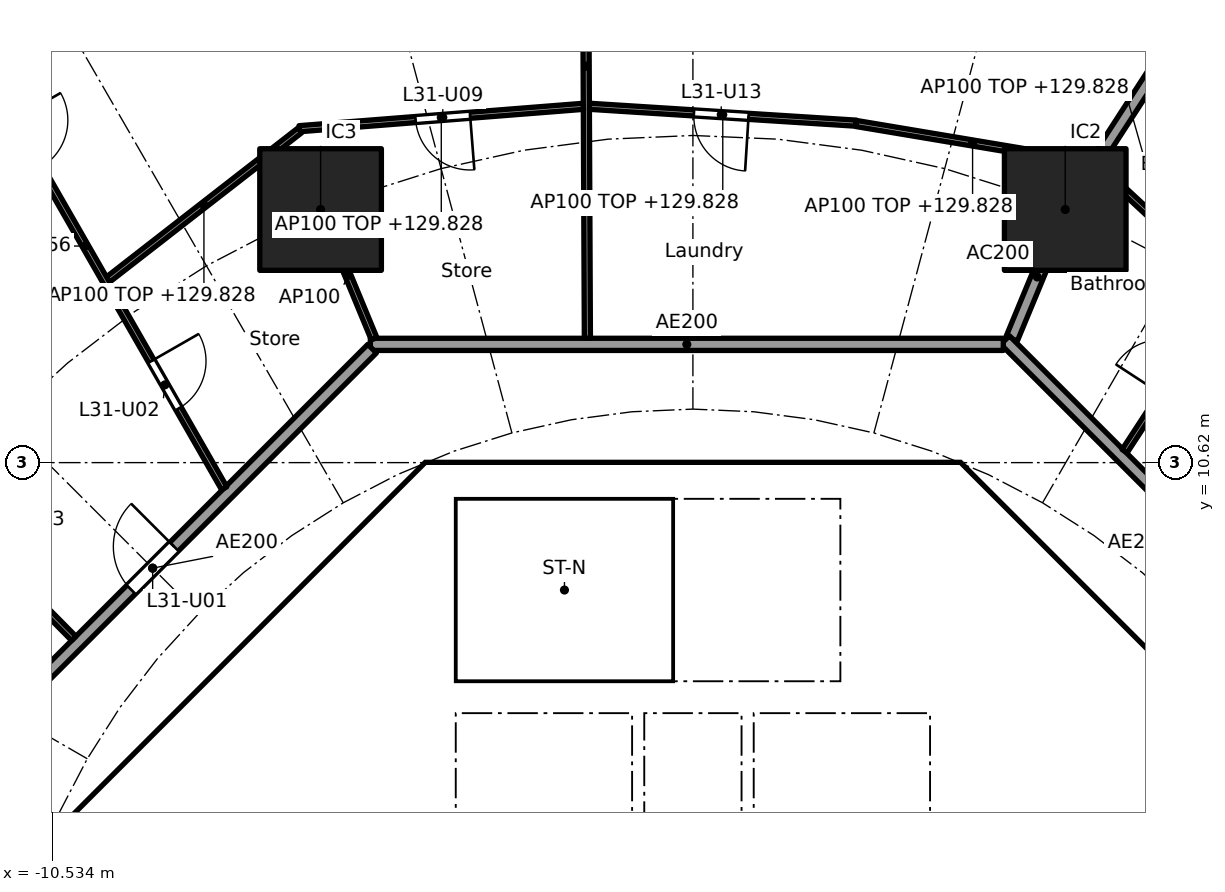
"""IFC4 building model, lengths in metres.
Left out: names, types, materials, properties, quantities, classifications, styles, units other than length and angle.
Written with IfcOpenShell. Run it as: python <this file> out.ifc"""

import sys

from ifc_helpers import new_model, si_unit, direction, frame, frame_2d, origin, origin_2d, place, context, subcontext, project, spatial, polyline, rectangle, outline, extrude, element, fill, save


model = new_model("IFC4")
c1 = context("Model", 3, precision=1e-05, world=origin(), true_north=direction((0.0, 1.0)))
c2 = subcontext(c1, "Body", "Model", "MODEL_VIEW")
j1 = project(units=[si_unit("LENGTHUNIT", "METRE"), si_unit("PLANEANGLEUNIT", "RADIAN")], contexts=[c1])
p1 = place(None, origin())
s1 = spatial("IfcSite", under=j1, at=p1, CompositionType="ELEMENT")
p2 = place(p1, origin())
s2 = spatial("IfcBuilding", under=s1, at=p2, CompositionType="ELEMENT")
p3 = place(p2, frame((0.0, 0.0, 127.0)))
s3 = spatial("IfcBuildingStorey", under=s2, at=p3, CompositionType="ELEMENT", Elevation=127.0)
for number, where, z_axis, x_axis in (
    (1, (6.123, 14.782, 0.0), (0.0, 0.0, 1.0), (1.0, 0.0, 0.0)),
    (2, (-6.123, 14.782, 0.0), (0.0, 0.0, 1.0), (1.0, 0.0, 0.0)),
):
    element("IfcColumn", number, at=place(p3, frame(where, z_axis=z_axis, x_axis=x_axis)), inside=s3, PredefinedType="COLUMN", context=c2, shape_type="SweptSolid", body=[
        extrude(rectangle(XDim=2.0, YDim=2.0, at=origin_2d()), origin(), (0.0, 0.0, 1.0), 3.7),
    ])
p4 = place(p3, frame((9.988, 4.613, 0.0), z_axis=(0.0, 0.0, 1.0), x_axis=(-0.707106781187, 0.707106781187, 0.0)))
e3 = element("IfcWall", 3, at=p4, inside=s3, PredefinedType="SHEAR", context=c2, shape_type="SweptSolid", body=[
    extrude(rectangle(XDim=7.602, YDim=0.6, at=frame_2d((3.801, 0.0))), origin(), (0.0, 0.0, 1.0), 3.44),
])
p5 = place(p4, frame((3.201, 0.0, 0.0)))
e4 = element("IfcOpeningElement", 4, at=p5, cuts=e3, PredefinedType="OPENING", context=c2, shape_type="SweptSolid", body=[
    extrude(rectangle(XDim=1.2, YDim=2.1, at=frame_2d((0.6, 1.05))), frame((0.0, 0.31, 0.0), z_axis=(0.0, -1.0, 0.0), x_axis=(1.0, 0.0, 0.0)), (0.0, 0.0, 1.0), 0.62),
])
p6 = place(p3, frame((-4.613, 9.988, 0.0), z_axis=(0.0, 0.0, 1.0), x_axis=(-0.707106781187, -0.707106781187, 0.0)))
e5 = element("IfcWall", 5, at=p6, inside=s3, PredefinedType="SHEAR", context=c2, shape_type="SweptSolid", body=[
    extrude(rectangle(XDim=7.602, YDim=0.6, at=frame_2d((3.801, 0.0))), origin(), (0.0, 0.0, 1.0), 3.44),
])
p7 = place(p6, frame((0.351, 0.0, 0.0)))
e6 = element("IfcOpeningElement", 6, at=p7, cuts=e5, PredefinedType="OPENING", context=c2, shape_type="SweptSolid", body=[
    extrude(rectangle(XDim=1.1, YDim=2.1, at=frame_2d((0.55, 1.05))), frame((0.0, 0.31, 0.0), z_axis=(0.0, -1.0, 0.0), x_axis=(1.0, 0.0, 0.0)), (0.0, 0.0, 1.0), 0.62),
])
p8 = place(p3, frame((-6.2, 4.3, 0.0), z_axis=(0.0, 0.0, 1.0), x_axis=(0.0, 1.0, 0.0)))
e7 = element("IfcWall", 7, at=p8, inside=s3, PredefinedType="PARTITIONING", context=c2, shape_type="SweptSolid", body=[
    extrude(rectangle(XDim=3.527, YDim=0.15, at=frame_2d((1.763, 0.0))), origin(), (0.0, 0.0, 1.0), 3.44),
])
p9 = place(p8, frame((0.262, 0.0, 0.0)))
e8 = element("IfcOpeningElement", 8, at=p9, cuts=e7, PredefinedType="OPENING", context=c2, shape_type="SweptSolid", body=[
    extrude(rectangle(XDim=0.9, YDim=2.1, at=frame_2d((0.45, 1.05))), frame((0.0, 0.085, 0.0), z_axis=(0.0, -1.0, 0.0), x_axis=(1.0, 0.0, 0.0)), (0.0, 0.0, 1.0), 0.17),
])
p10 = place(p8, frame((2.138, 0.0, 0.0)))
e9 = element("IfcOpeningElement", 9, at=p10, cuts=e7, PredefinedType="OPENING", context=c2, shape_type="SweptSolid", body=[
    extrude(rectangle(XDim=0.9, YDim=2.1, at=frame_2d((0.45, 1.05))), frame((0.0, 0.085, 0.0), z_axis=(0.0, -1.0, 0.0), x_axis=(1.0, 0.0, 0.0)), (0.0, 0.0, 1.0), 0.17),
])
p11 = place(p3, frame((4.0, 4.3, 0.0), z_axis=(0.0, 0.0, 1.0), x_axis=(0.0, 1.0, 0.0)))
e10 = element("IfcWall", 10, at=p11, inside=s3, PredefinedType="SOLIDWALL", context=c2, shape_type="SweptSolid", body=[
    extrude(rectangle(XDim=2.2, YDim=0.2, at=frame_2d((1.1, 0.0))), origin(), (0.0, 0.0, 1.0), 3.44),
])
p12 = place(p11, frame((0.55, 0.0, 0.0)))
e11 = element("IfcOpeningElement", 11, at=p12, cuts=e10, PredefinedType="OPENING", context=c2, shape_type="SweptSolid", body=[
    extrude(rectangle(XDim=1.1, YDim=2.1, at=frame_2d((0.55, 1.05))), frame((0.0, 0.11, 0.0), z_axis=(0.0, -1.0, 0.0), x_axis=(1.0, 0.0, 0.0)), (0.0, 0.0, 1.0), 0.22),
])
p13 = place(p3, frame((-4.0, 4.3, 0.0), z_axis=(0.0, 0.0, 1.0), x_axis=(0.0, 1.0, 0.0)))
e12 = element("IfcWall", 12, at=p13, inside=s3, PredefinedType="SOLIDWALL", context=c2, shape_type="SweptSolid", body=[
    extrude(rectangle(XDim=2.2, YDim=0.2, at=frame_2d((1.1, 0.0))), origin(), (0.0, 0.0, 1.0), 3.44),
])
p14 = place(p13, frame((0.55, 0.0, 0.0)))
e13 = element("IfcOpeningElement", 13, at=p14, cuts=e12, PredefinedType="OPENING", context=c2, shape_type="SweptSolid", body=[
    extrude(rectangle(XDim=1.1, YDim=2.1, at=frame_2d((0.55, 1.05))), frame((0.0, 0.11, 0.0), z_axis=(0.0, -1.0, 0.0), x_axis=(1.0, 0.0, 0.0)), (0.0, 0.0, 1.0), 0.22),
])
p15 = place(p3, frame((4.0, 7.025, 0.0), z_axis=(0.0, 0.0, 1.0), x_axis=(0.0, 1.0, 0.0)))
e14 = element("IfcWall", 14, at=p15, inside=s3, PredefinedType="SOLIDWALL", context=c2, shape_type="SweptSolid", body=[
    extrude(rectangle(XDim=3.0, YDim=0.2, at=frame_2d((1.5, 0.0))), origin(), (0.0, 0.0, 1.0), 3.44),
])
p16 = place(p15, frame((0.925, 0.0, 0.0)))
e15 = element("IfcOpeningElement", 15, at=p16, cuts=e14, PredefinedType="OPENING", context=c2, shape_type="SweptSolid", body=[
    extrude(rectangle(XDim=1.1, YDim=2.1, at=frame_2d((0.55, 1.05))), frame((0.0, 0.11, 0.0), z_axis=(0.0, -1.0, 0.0), x_axis=(1.0, 0.0, 0.0)), (0.0, 0.0, 1.0), 0.22),
])
p17 = place(p3, origin())
e16 = element("IfcWall", 16, at=p17, inside=s3, PredefinedType="SHEAR", context=c2, shape_type="SweptSolid", body=[
    extrude(outline(polyline([(-4.152, 10.025), (-4.401, 9.776), (-4.825, 10.2), (-4.401, 10.625), (4.401, 10.625), (4.825, 10.2), (4.401, 9.776), (4.152, 10.025), (-4.152, 10.025)])), origin(), (0.0, 0.0, 1.0), 3.44),
])
p18 = place(p3, frame((-8.301, 5.8, 0.0), z_axis=(0.0, 0.0, 1.0), x_axis=(1.0, 0.0, 0.0)))
e17 = element("IfcWall", 17, at=p18, inside=s3, PredefinedType="PARTITIONING", context=c2, shape_type="SweptSolid", body=[
    extrude(rectangle(XDim=2.026, YDim=0.15, at=frame_2d((1.013, 0.0))), origin(), (0.0, 0.0, 1.0), 3.44),
])
for number, where, z_axis, x_axis in (
    (18, (-0.9, 4.3, 0.0), (0.0, 0.0, 1.0), (0.0, 1.0, 0.0)),
    (19, (0.9, 4.3, 0.0), (0.0, 0.0, 1.0), (0.0, 1.0, 0.0)),
):
    element("IfcWall", number, at=place(p3, frame(where, z_axis=z_axis, x_axis=x_axis)), inside=s3, PredefinedType="SOLIDWALL", context=c2, shape_type="SweptSolid", body=[
        extrude(rectangle(XDim=2.2, YDim=0.2, at=frame_2d((1.1, 0.0))), origin(), (0.0, 0.0, 1.0), 3.44),
    ])
p19 = place(p3, origin())
e20 = element("IfcWall", 20, at=p19, inside=s3, PredefinedType="SOLIDWALL", context=c2, shape_type="SweptSolid", body=[
    extrude(outline(polyline([(-3.9, 7.025), (-4.1, 7.025), (-4.1, 10.025), (-3.9, 10.025), (-3.9, 7.025)])), origin(), (0.0, 0.0, 1.0), 3.44),
])
p20 = place(p3, origin())
e21 = element("IfcWall", 21, at=p20, inside=s3, PredefinedType="SOLIDWALL", context=c2, shape_type="SweptSolid", body=[
    extrude(outline(polyline([(4.1, 6.5), (-4.1, 6.5), (-4.1, 7.025), (4.1, 7.025), (4.1, 6.5)])), origin(), (0.0, 0.0, 1.0), 3.44),
])
p21 = place(p3, frame((5.243, 12.657, 0.0), z_axis=(0.0, 0.0, 1.0), x_axis=(0.38273085373, 0.923859888513, 0.0)))
e22 = element("IfcWall", 22, at=p21, inside=s3, PredefinedType="PARTITIONING", context=c2, shape_type="SweptSolid", body=[
    extrude(rectangle(XDim=2.199, YDim=0.2, at=frame_2d((1.1, 0.0))), origin(), (0.0, 0.0, 1.0), 3.44),
])
p22 = place(p3, frame((6.15, 14.824, 0.0), z_axis=(0.0, 0.0, 1.0), x_axis=(0.543695254109, 0.839282711998, 0.0)))
e23 = element("IfcWall", 23, at=p22, inside=s3, PredefinedType="PARTITIONING", context=c2, shape_type="SweptSolid", body=[
    extrude(rectangle(XDim=8.731, YDim=0.2, at=frame_2d((4.366, 0.0))), origin(), (0.0, 0.0, 1.0), 2.828),
])
p23 = place(p3, frame((12.635, 5.134, 0.0), z_axis=(0.0, 0.0, 1.0), x_axis=(-0.707106781187, 0.707106781187, 0.0)))
e24 = element("IfcWall", 24, at=p23, inside=s3, PredefinedType="PARTITIONING", context=c2, shape_type="SweptSolid", body=[
    extrude(rectangle(XDim=10.609, YDim=0.2, at=frame_2d((5.305, 0.0))), origin(), (0.0, 0.0, 1.0), 3.44),
])
p24 = place(p23, frame((4.804, 0.0, 0.0)))
e25 = element("IfcOpeningElement", 25, at=p24, cuts=e24, PredefinedType="OPENING", context=c2, shape_type="SweptSolid", body=[
    extrude(rectangle(XDim=1.0, YDim=2.1, at=frame_2d((0.5, 1.05))), frame((0.0, 0.11, 0.0), z_axis=(0.0, -1.0, 0.0), x_axis=(1.0, 0.0, 0.0)), (0.0, 0.0, 1.0), 0.22),
])
p25 = place(p3, frame((5.104, 12.565, 0.0), z_axis=(0.0, 0.0, 1.0), x_axis=(-1.0, 0.0, 0.0)))
e26 = element("IfcWall", 26, at=p25, inside=s3, PredefinedType="PARTITIONING", context=c2, shape_type="SweptSolid", body=[
    extrude(rectangle(XDim=10.409, YDim=0.2, at=frame_2d((5.205, 0.0))), origin(), (0.0, 0.0, 1.0), 3.44),
])
p26 = place(p3, frame((-5.275, 12.494, 0.0), z_axis=(0.0, 0.0, 1.0), x_axis=(-0.707106781187, -0.707106781187, 0.0)))
e27 = element("IfcWall", 27, at=p26, inside=s3, PredefinedType="PARTITIONING", context=c2, shape_type="SweptSolid", body=[
    extrude(rectangle(XDim=10.209, YDim=0.2, at=frame_2d((5.104, 0.0))), origin(), (0.0, 0.0, 1.0), 3.44),
])
p27 = place(p26, frame((4.604, 0.0, 0.0)))
e28 = element("IfcOpeningElement", 28, at=p27, cuts=e27, PredefinedType="OPENING", context=c2, shape_type="SweptSolid", body=[
    extrude(rectangle(XDim=1.0, YDim=2.1, at=frame_2d((0.5, 1.05))), frame((0.0, 0.11, 0.0), z_axis=(0.0, -1.0, 0.0), x_axis=(1.0, 0.0, 0.0)), (0.0, 0.0, 1.0), 0.22),
])
p28 = place(p3, frame((7.099, 10.808, 0.0), z_axis=(0.0, 0.0, 1.0), x_axis=(0.546709757921, 0.837322184463, 0.0)))
e29 = element("IfcWall", 29, at=p28, inside=s3, PredefinedType="PARTITIONING", context=c2, shape_type="SweptSolid", body=[
    extrude(rectangle(XDim=3.134, YDim=0.1, at=frame_2d((1.567, 0.0))), origin(), (0.0, 0.0, 1.0), 2.756),
])
p29 = place(p28, frame((1.117, 0.0, 0.0)))
e30 = element("IfcOpeningElement", 30, at=p29, cuts=e29, PredefinedType="OPENING", context=c2, shape_type="SweptSolid", body=[
    extrude(rectangle(XDim=0.9, YDim=2.1, at=frame_2d((0.45, 1.05))), frame((0.0, 0.06, 0.0), z_axis=(0.0, -1.0, 0.0), x_axis=(1.0, 0.0, 0.0)), (0.0, 0.0, 1.0), 0.12),
])
p30 = place(p3, frame((8.803, 13.508, 0.0), z_axis=(0.0, 0.0, 1.0), x_axis=(-0.733124766325, 0.680094167745, 0.0)))
e31 = element("IfcWall", 31, at=p30, inside=s3, PredefinedType="PARTITIONING", context=c2, shape_type="SweptSolid", body=[
    extrude(rectangle(XDim=2.886, YDim=0.1, at=frame_2d((1.443, 0.0))), origin(), (0.0, 0.0, 1.0), 2.828),
])
p31 = place(p3, frame((6.515, 15.556, 0.0), z_axis=(0.0, 0.0, 1.0), x_axis=(-0.986271328884, 0.16513287323, 0.0)))
e32 = element("IfcWall", 32, at=p31, inside=s3, PredefinedType="PARTITIONING", context=c2, shape_type="SweptSolid", body=[
    extrude(rectangle(XDim=3.884, YDim=0.1, at=frame_2d((1.942, 0.0))), origin(), (0.0, 0.0, 1.0), 2.828),
])
p32 = place(p3, frame((2.685, 16.202, 0.0), z_axis=(0.0, 0.0, 1.0), x_axis=(-0.998000808042, 0.063201164138, 0.0)))
e33 = element("IfcWall", 33, at=p32, inside=s3, PredefinedType="PARTITIONING", context=c2, shape_type="SweptSolid", body=[
    extrude(rectangle(XDim=4.396, YDim=0.1, at=frame_2d((2.198, 0.0))), origin(), (0.0, 0.0, 1.0), 2.828),
])
p33 = place(p32, frame((1.773, 0.0, 0.0)))
e34 = element("IfcOpeningElement", 34, at=p33, cuts=e33, PredefinedType="OPENING", context=c2, shape_type="SweptSolid", body=[
    extrude(rectangle(XDim=0.9, YDim=2.1, at=frame_2d((0.45, 1.05))), frame((0.0, 0.06, 0.0), z_axis=(0.0, -1.0, 0.0), x_axis=(1.0, 0.0, 0.0)), (0.0, 0.0, 1.0), 0.12),
])
p34 = place(p3, frame((-1.735, 12.665, 0.0), z_axis=(0.0, 0.0, 1.0), x_axis=(-0.004474716456, 0.999989988406, 0.0)))
e35 = element("IfcWall", 35, at=p34, inside=s3, PredefinedType="PARTITIONING", context=c2, shape_type="SweptSolid", body=[
    extrude(rectangle(XDim=8.948, YDim=0.1, at=frame_2d((4.474, 0.0))), origin(), (0.0, 0.0, 1.0), 2.756),
])
p35 = place(p34, frame((5.908, 0.0, 0.0)))
e36 = element("IfcOpeningElement", 36, at=p35, cuts=e35, PredefinedType="OPENING", context=c2, shape_type="SweptSolid", body=[
    extrude(rectangle(XDim=0.9, YDim=2.1, at=frame_2d((0.45, 1.05))), frame((0.0, 0.06, 0.0), z_axis=(0.0, -1.0, 0.0), x_axis=(1.0, 0.0, 0.0)), (0.0, 0.0, 1.0), 0.12),
])
p36 = place(p3, frame((-1.802, 16.479, 0.0), z_axis=(0.0, 0.0, 1.0), x_axis=(-0.996909003513, -0.078564869469, 0.0)))
e37 = element("IfcWall", 37, at=p36, inside=s3, PredefinedType="PARTITIONING", context=c2, shape_type="SweptSolid", body=[
    extrude(rectangle(XDim=4.686, YDim=0.1, at=frame_2d((2.343, 0.0))), origin(), (0.0, 0.0, 1.0), 2.828),
])
p37 = place(p36, frame((1.868, 0.0, 0.0)))
e38 = element("IfcOpeningElement", 38, at=p37, cuts=e37, PredefinedType="OPENING", context=c2, shape_type="SweptSolid", body=[
    extrude(rectangle(XDim=0.9, YDim=2.1, at=frame_2d((0.45, 1.05))), frame((0.0, 0.06, 0.0), z_axis=(0.0, -1.0, 0.0), x_axis=(1.0, 0.0, 0.0)), (0.0, 0.0, 1.0), 0.12),
])
p38 = place(p3, frame((-5.243, 12.657, 0.0), z_axis=(0.0, 0.0, 1.0), x_axis=(-0.382719158442, 0.923864733477, 0.0)))
e39 = element("IfcWall", 39, at=p38, inside=s3, PredefinedType="PARTITIONING", context=c2, shape_type="SweptSolid", body=[
    extrude(rectangle(XDim=2.25, YDim=0.1, at=frame_2d((1.125, 0.0))), origin(), (0.0, 0.0, 1.0), 3.44),
])
p39 = place(p3, frame((-6.463, 16.084, 0.0), z_axis=(0.0, 0.0, 1.0), x_axis=(-0.789457442969, -0.613805299538, 0.0)))
e40 = element("IfcWall", 40, at=p39, inside=s3, PredefinedType="PARTITIONING", context=c2, shape_type="SweptSolid", body=[
    extrude(rectangle(XDim=3.997, YDim=0.1, at=frame_2d((1.999, 0.0))), origin(), (0.0, 0.0, 1.0), 2.828),
])
p40 = place(p3, frame((-7.708, 10.198, 0.0), z_axis=(0.0, 0.0, 1.0), x_axis=(-0.497449462689, 0.867492957937, 0.0)))
e41 = element("IfcWall", 41, at=p40, inside=s3, PredefinedType="PARTITIONING", context=c2, shape_type="SweptSolid", body=[
    extrude(rectangle(XDim=9.185, YDim=0.1, at=frame_2d((4.592, 0.0))), origin(), (0.0, 0.0, 1.0), 2.756),
])
p41 = place(p40, frame((1.511, 0.0, 0.0)))
e42 = element("IfcOpeningElement", 42, at=p41, cuts=e41, PredefinedType="OPENING", context=c2, shape_type="SweptSolid", body=[
    extrude(rectangle(XDim=0.9, YDim=2.1, at=frame_2d((0.45, 1.05))), frame((0.0, 0.06, 0.0), z_axis=(0.0, -1.0, 0.0), x_axis=(1.0, 0.0, 0.0)), (0.0, 0.0, 1.0), 0.12),
])
p42 = place(p40, frame((6.078, 0.0, 0.0)))
e43 = element("IfcOpeningElement", 43, at=p42, cuts=e41, PredefinedType="OPENING", context=c2, shape_type="SweptSolid", body=[
    extrude(rectangle(XDim=0.9, YDim=2.1, at=frame_2d((0.45, 1.05))), frame((0.0, 0.06, 0.0), z_axis=(0.0, -1.0, 0.0), x_axis=(1.0, 0.0, 0.0)), (0.0, 0.0, 1.0), 0.12),
])
p43 = place(p3, frame((-10.182, 7.729, 0.0), z_axis=(0.0, 0.0, 1.0), x_axis=(-0.702927211734, 0.711261790766, 0.0)))
e44 = element("IfcWall", 44, at=p43, inside=s3, PredefinedType="PARTITIONING", context=c2, shape_type="SweptSolid", body=[
    extrude(rectangle(XDim=9.168, YDim=0.1, at=frame_2d((4.584, 0.0))), origin(), (0.0, 0.0, 1.0), 2.756),
])
p44 = place(p43, frame((1.507, 0.0, 0.0)))
e45 = element("IfcOpeningElement", 45, at=p44, cuts=e44, PredefinedType="OPENING", context=c2, shape_type="SweptSolid", body=[
    extrude(rectangle(XDim=0.9, YDim=2.1, at=frame_2d((0.45, 1.05))), frame((0.0, 0.06, 0.0), z_axis=(0.0, -1.0, 0.0), x_axis=(1.0, 0.0, 0.0)), (0.0, 0.0, 1.0), 0.12),
])
p45 = place(p43, frame((6.067, 0.0, 0.0)))
e46 = element("IfcOpeningElement", 46, at=p45, cuts=e44, PredefinedType="OPENING", context=c2, shape_type="SweptSolid", body=[
    extrude(rectangle(XDim=0.9, YDim=2.1, at=frame_2d((0.45, 1.05))), frame((0.0, 0.06, 0.0), z_axis=(0.0, -1.0, 0.0), x_axis=(1.0, 0.0, 0.0)), (0.0, 0.0, 1.0), 0.12),
])
p46 = place(p12, origin())
e47 = element("IfcDoor", 47, at=p46, inside=s3, OperationType="DOUBLE_DOOR_SLIDING", PredefinedType="DOOR", context=c2, shape_type="SweptSolid", body=[
    extrude(rectangle(XDim=1.1, YDim=2.1, at=frame_2d((0.55, 1.05))), frame((0.0, 0.025, 0.0), z_axis=(0.0, -1.0, 0.0), x_axis=(1.0, 0.0, 0.0)), (0.0, 0.0, 1.0), 0.05),
])
fill(e11, e47)
p47 = place(p14, origin())
e48 = element("IfcDoor", 48, at=p47, inside=s3, OperationType="DOUBLE_DOOR_SLIDING", PredefinedType="DOOR", context=c2, shape_type="SweptSolid", body=[
    extrude(rectangle(XDim=1.1, YDim=2.1, at=frame_2d((0.55, 1.05))), frame((0.0, 0.025, 0.0), z_axis=(0.0, -1.0, 0.0), x_axis=(1.0, 0.0, 0.0)), (0.0, 0.0, 1.0), 0.05),
])
fill(e13, e48)
p48 = place(p16, origin())
e49 = element("IfcDoor", 49, at=p48, inside=s3, OperationType="SINGLE_SWING_LEFT", PredefinedType="DOOR", context=c2, shape_type="SweptSolid", body=[
    extrude(rectangle(XDim=1.1, YDim=2.1, at=frame_2d((0.55, 1.05))), frame((0.0, 0.025, 0.0), z_axis=(0.0, -1.0, 0.0), x_axis=(1.0, 0.0, 0.0)), (0.0, 0.0, 1.0), 0.05),
])
fill(e15, e49)
p49 = place(p9, origin())
e50 = element("IfcDoor", 50, at=p49, inside=s3, OperationType="SINGLE_SWING_RIGHT", PredefinedType="DOOR", context=c2, shape_type="SweptSolid", body=[
    extrude(rectangle(XDim=0.9, YDim=2.1, at=frame_2d((0.45, 1.05))), frame((0.0, 0.025, 0.0), z_axis=(0.0, -1.0, 0.0), x_axis=(1.0, 0.0, 0.0)), (0.0, 0.0, 1.0), 0.05),
])
fill(e8, e50)
p50 = place(p10, origin())
e51 = element("IfcDoor", 51, at=p50, inside=s3, OperationType="SINGLE_SWING_RIGHT", PredefinedType="DOOR", context=c2, shape_type="SweptSolid", body=[
    extrude(rectangle(XDim=0.9, YDim=2.1, at=frame_2d((0.45, 1.05))), frame((0.0, 0.025, 0.0), z_axis=(0.0, -1.0, 0.0), x_axis=(1.0, 0.0, 0.0)), (0.0, 0.0, 1.0), 0.05),
])
fill(e9, e51)
p51 = place(p5, origin())
e52 = element("IfcDoor", 52, at=p51, inside=s3, OperationType="SINGLE_SWING_RIGHT", PredefinedType="DOOR", context=c2, shape_type="SweptSolid", body=[
    extrude(rectangle(XDim=1.2, YDim=2.1, at=frame_2d((0.6, 1.05))), frame((0.0, 0.025, 0.0), z_axis=(0.0, -1.0, 0.0), x_axis=(1.0, 0.0, 0.0)), (0.0, 0.0, 1.0), 0.05),
])
fill(e4, e52)
p52 = place(p7, origin())
e53 = element("IfcDoor", 53, at=p52, inside=s3, OperationType="SINGLE_SWING_RIGHT", PredefinedType="DOOR", context=c2, shape_type="SweptSolid", body=[
    extrude(rectangle(XDim=1.1, YDim=2.1, at=frame_2d((0.55, 1.05))), frame((0.0, 0.025, 0.0), z_axis=(0.0, -1.0, 0.0), x_axis=(1.0, 0.0, 0.0)), (0.0, 0.0, 1.0), 0.05),
])
fill(e6, e53)
p53 = place(p27, frame((1.0, 0.0, 0.0), x_axis=(-1.0, 0.0, 0.0)))
e54 = element("IfcDoor", 54, at=p53, inside=s3, OperationType="SINGLE_SWING_RIGHT", PredefinedType="DOOR", context=c2, shape_type="SweptSolid", body=[
    extrude(rectangle(XDim=1.0, YDim=2.1, at=frame_2d((0.5, 1.05))), frame((0.0, 0.025, 0.0), z_axis=(0.0, -1.0, 0.0), x_axis=(1.0, 0.0, 0.0)), (0.0, 0.0, 1.0), 0.05),
])
fill(e28, e54)
p54 = place(p41, frame((0.9, 0.0, 0.0), x_axis=(-1.0, 0.0, 0.0)))
e55 = element("IfcDoor", 55, at=p54, inside=s3, OperationType="SINGLE_SWING_LEFT", PredefinedType="DOOR", context=c2, shape_type="SweptSolid", body=[
    extrude(rectangle(XDim=0.9, YDim=2.1, at=frame_2d((0.45, 1.05))), frame((0.0, 0.025, 0.0), z_axis=(0.0, -1.0, 0.0), x_axis=(1.0, 0.0, 0.0)), (0.0, 0.0, 1.0), 0.05),
])
fill(e42, e55)
p55 = place(p37, origin())
e56 = element("IfcDoor", 56, at=p55, inside=s3, OperationType="SINGLE_SWING_LEFT", PredefinedType="DOOR", context=c2, shape_type="SweptSolid", body=[
    extrude(rectangle(XDim=0.9, YDim=2.1, at=frame_2d((0.45, 1.05))), frame((0.0, 0.025, 0.0), z_axis=(0.0, -1.0, 0.0), x_axis=(1.0, 0.0, 0.0)), (0.0, 0.0, 1.0), 0.05),
])
fill(e38, e56)
p56 = place(p33, origin())
e57 = element("IfcDoor", 57, at=p56, inside=s3, OperationType="SINGLE_SWING_LEFT", PredefinedType="DOOR", context=c2, shape_type="SweptSolid", body=[
    extrude(rectangle(XDim=0.9, YDim=2.1, at=frame_2d((0.45, 1.05))), frame((0.0, 0.025, 0.0), z_axis=(0.0, -1.0, 0.0), x_axis=(1.0, 0.0, 0.0)), (0.0, 0.0, 1.0), 0.05),
])
fill(e34, e57)
save(model, sys.argv[1])
